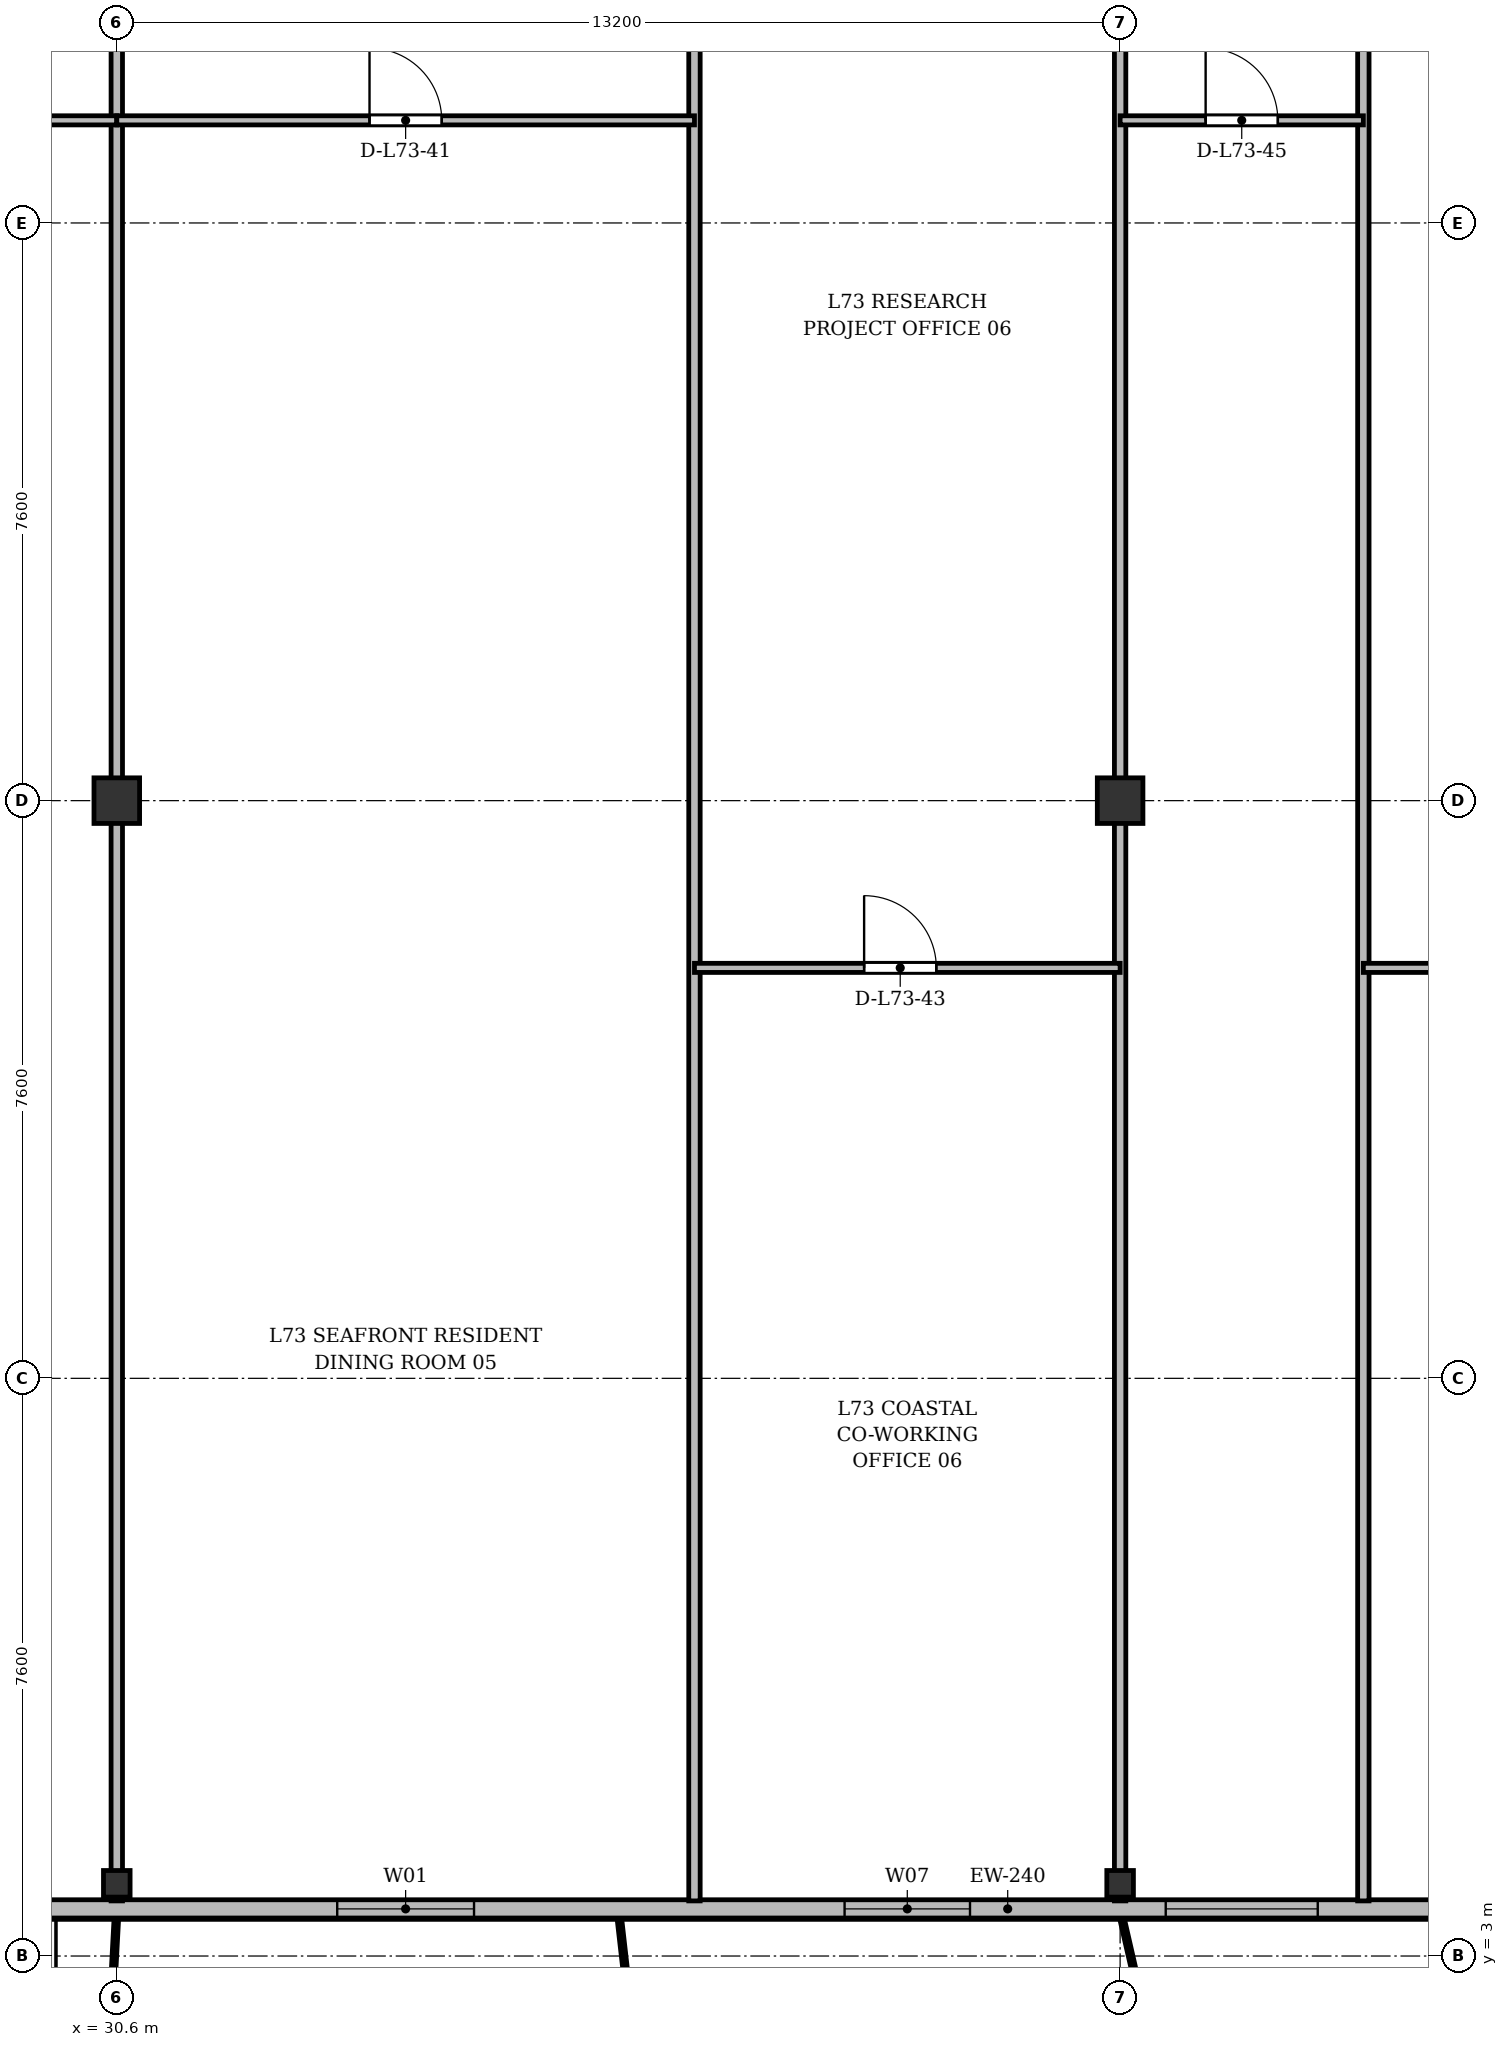
"""IFC4 building model, lengths in metres.
Left out: names, types, materials, properties, quantities, classifications, styles, units other than length and angle.
Written with IfcOpenShell. Run it as: python <this file> out.ifc"""

import sys

from ifc_helpers import new_model, si_unit, direction, frame, frame_2d, origin, origin_2d, place, context, subcontext, project, spatial, rectangle, i_section, extrude, source, transform, mapped, element, fill, save


model = new_model("IFC4")
c1 = context("Model", 3, precision=1e-05, world=origin(), true_north=direction((0.0, 1.0)))
c2 = subcontext(c1, "Body", "Model", "MODEL_VIEW")
j1 = project(units=[si_unit("LENGTHUNIT", "METRE"), si_unit("PLANEANGLEUNIT", "RADIAN")], contexts=[c1])
p1 = place(None, origin())
s1 = spatial("IfcSite", under=j1, at=p1, CompositionType="ELEMENT")
p2 = place(p1, origin())
s2 = spatial("IfcBuilding", under=s1, at=p2, CompositionType="ELEMENT")
p3 = place(p2, frame((0.0, 0.0, 281.1)))
s3 = spatial("IfcBuildingStorey", under=s2, at=p3, CompositionType="ELEMENT", Elevation=281.1)
m1 = source(origin(), c2, "Body", "SweptSolid", [
    extrude(i_section(OverallWidth=0.35, OverallDepth=0.35, WebThickness=0.018, FlangeThickness=0.028, at=origin_2d()), origin(), (0.0, 0.0, 1.0), 3.6),
])
p4 = place(p3, frame((30.6, 3.95, 0.0), z_axis=(0.0, 0.0, 1.0), x_axis=(1.0, 0.0, 0.0)))
e1 = element("IfcColumn", 1, at=p4, inside=s3, PredefinedType="COLUMN", context=c2, shape_type="MappedRepresentation", body=[
    mapped(m1, transform((0.0, 0.0, 0.0), x_axis=(1.0, 0.0, 0.0), y_axis=(0.0, 1.0, 0.0), z_axis=(0.0, 0.0, 1.0), scale=1.0)),
])
m2 = source(origin(), c2, "Body", "SweptSolid", [
    extrude(rectangle(XDim=0.6, YDim=0.6, at=origin_2d()), origin(), (0.0, 0.0, 1.0), 3.6),
])
p5 = place(p3, frame((30.6, 18.2, 0.0), z_axis=(0.0, 0.0, 1.0), x_axis=(1.0, 0.0, 0.0)))
e2 = element("IfcColumn", 2, at=p5, inside=s3, PredefinedType="COLUMN", context=c2, shape_type="MappedRepresentation", body=[
    mapped(m2, transform((0.0, 0.0, 0.0), x_axis=(1.0, 0.0, 0.0), y_axis=(0.0, 1.0, 0.0), z_axis=(0.0, 0.0, 1.0), scale=1.0)),
])
p6 = place(p3, frame((43.8, 3.95, 0.0), z_axis=(0.0, 0.0, 1.0), x_axis=(1.0, 0.0, 0.0)))
e3 = element("IfcColumn", 3, at=p6, inside=s3, PredefinedType="COLUMN", context=c2, shape_type="MappedRepresentation", body=[
    mapped(m1, transform((0.0, 0.0, 0.0), x_axis=(1.0, 0.0, 0.0), y_axis=(0.0, 1.0, 0.0), z_axis=(0.0, 0.0, 1.0), scale=1.0)),
])
p7 = place(p3, frame((43.8, 18.2, 0.0), z_axis=(0.0, 0.0, 1.0), x_axis=(1.0, 0.0, 0.0)))
e4 = element("IfcColumn", 4, at=p7, inside=s3, PredefinedType="COLUMN", context=c2, shape_type="MappedRepresentation", body=[
    mapped(m2, transform((0.0, 0.0, 0.0), x_axis=(1.0, 0.0, 0.0), y_axis=(0.0, 1.0, 0.0), z_axis=(0.0, 0.0, 1.0), scale=1.0)),
])
p8 = place(p3, frame((63.2, 3.62, 0.0), z_axis=(0.0, 0.0, 1.0), x_axis=(-1.0, 0.0, 0.0)))
e5 = element("IfcWall", 5, at=p8, inside=s3, PredefinedType="SOLIDWALL", context=c2, shape_type="SweptSolid", body=[
    extrude(rectangle(XDim=52.0, YDim=0.24, at=frame_2d((26.0, 0.0))), origin(), (0.0, 0.0, 1.0), 3.37),
])
p9 = place(p8, frame((0.745, 0.0, 0.9)))
e6 = element("IfcOpeningElement", 6, at=p9, cuts=e5, PredefinedType="OPENING", context=c2, shape_type="SweptSolid", body=[
    extrude(rectangle(XDim=2.0, YDim=1.95, at=frame_2d((1.0, 0.975))), frame((0.0, 0.13, 0.0), z_axis=(0.0, -1.0, 0.0), x_axis=(1.0, 0.0, 0.0)), (0.0, 0.0, 1.0), 0.26),
])
p10 = place(p8, frame((4.793, 0.0, 0.9)))
e7 = element("IfcOpeningElement", 7, at=p10, cuts=e5, PredefinedType="OPENING", context=c2, shape_type="SweptSolid", body=[
    extrude(rectangle(XDim=1.35, YDim=1.5, at=frame_2d((0.675, 0.75))), frame((0.0, 0.13, 0.0), z_axis=(0.0, -1.0, 0.0), x_axis=(1.0, 0.0, 0.0)), (0.0, 0.0, 1.0), 0.26),
])
p11 = place(p8, frame((6.685, 0.0, 0.0)))
e8 = element("IfcOpeningElement", 8, at=p11, cuts=e5, PredefinedType="OPENING", context=c2, shape_type="SweptSolid", body=[
    extrude(rectangle(XDim=1.2, YDim=2.2, at=frame_2d((0.6, 1.1))), frame((0.0, 0.13, 0.0), z_axis=(0.0, -1.0, 0.0), x_axis=(1.0, 0.0, 0.0)), (0.0, 0.0, 1.0), 0.26),
])
p12 = place(p8, frame((9.634, 0.0, 0.9)))
e9 = element("IfcOpeningElement", 9, at=p12, cuts=e5, PredefinedType="OPENING", context=c2, shape_type="SweptSolid", body=[
    extrude(rectangle(XDim=2.2, YDim=1.8, at=frame_2d((1.1, 0.9))), frame((0.0, 0.13, 0.0), z_axis=(0.0, -1.0, 0.0), x_axis=(1.0, 0.0, 0.0)), (0.0, 0.0, 1.0), 0.26),
])
p13 = place(p8, frame((13.45, 0.0, 0.9)))
e10 = element("IfcOpeningElement", 10, at=p13, cuts=e5, PredefinedType="OPENING", context=c2, shape_type="SweptSolid", body=[
    extrude(rectangle(XDim=1.5, YDim=1.75, at=frame_2d((0.75, 0.875))), frame((0.0, 0.13, 0.0), z_axis=(0.0, -1.0, 0.0), x_axis=(1.0, 0.0, 0.0)), (0.0, 0.0, 1.0), 0.26),
])
p14 = place(p8, frame((16.8, 0.0, 0.9)))
e11 = element("IfcOpeningElement", 11, at=p14, cuts=e5, PredefinedType="OPENING", context=c2, shape_type="SweptSolid", body=[
    extrude(rectangle(XDim=2.0, YDim=1.95, at=frame_2d((1.0, 0.975))), frame((0.0, 0.13, 0.0), z_axis=(0.0, -1.0, 0.0), x_axis=(1.0, 0.0, 0.0)), (0.0, 0.0, 1.0), 0.26),
])
p15 = place(p8, frame((21.375, 0.0, 0.9)))
e12 = element("IfcOpeningElement", 12, at=p15, cuts=e5, PredefinedType="OPENING", context=c2, shape_type="SweptSolid", body=[
    extrude(rectangle(XDim=1.65, YDim=1.85, at=frame_2d((0.825, 0.925))), frame((0.0, 0.13, 0.0), z_axis=(0.0, -1.0, 0.0), x_axis=(1.0, 0.0, 0.0)), (0.0, 0.0, 1.0), 0.26),
])
p16 = place(p8, frame((27.9, 0.0, 0.9)))
e13 = element("IfcOpeningElement", 13, at=p16, cuts=e5, PredefinedType="OPENING", context=c2, shape_type="SweptSolid", body=[
    extrude(rectangle(XDim=1.8, YDim=1.8, at=frame_2d((0.9, 0.9))), frame((0.0, 0.13, 0.0), z_axis=(0.0, -1.0, 0.0), x_axis=(1.0, 0.0, 0.0)), (0.0, 0.0, 1.0), 0.26),
])
p17 = place(p8, frame((33.873, 0.0, 0.0)))
e14 = element("IfcOpeningElement", 14, at=p17, cuts=e5, PredefinedType="OPENING", context=c2, shape_type="SweptSolid", body=[
    extrude(rectangle(XDim=1.2, YDim=2.2, at=frame_2d((0.6, 1.1))), frame((0.0, 0.13, 0.0), z_axis=(0.0, -1.0, 0.0), x_axis=(1.0, 0.0, 0.0)), (0.0, 0.0, 1.0), 0.26),
])
p18 = place(p8, frame((37.05, 0.0, 0.9)))
e15 = element("IfcOpeningElement", 15, at=p18, cuts=e5, PredefinedType="OPENING", context=c2, shape_type="SweptSolid", body=[
    extrude(rectangle(XDim=1.5, YDim=1.75, at=frame_2d((0.75, 0.875))), frame((0.0, 0.13, 0.0), z_axis=(0.0, -1.0, 0.0), x_axis=(1.0, 0.0, 0.0)), (0.0, 0.0, 1.0), 0.26),
])
p19 = place(p8, frame((40.3, 0.0, 0.9)))
e16 = element("IfcOpeningElement", 16, at=p19, cuts=e5, PredefinedType="OPENING", context=c2, shape_type="SweptSolid", body=[
    extrude(rectangle(XDim=2.0, YDim=1.95, at=frame_2d((1.0, 0.975))), frame((0.0, 0.13, 0.0), z_axis=(0.0, -1.0, 0.0), x_axis=(1.0, 0.0, 0.0)), (0.0, 0.0, 1.0), 0.26),
])
p20 = place(p8, frame((43.475, 0.0, 0.9)))
e17 = element("IfcOpeningElement", 17, at=p20, cuts=e5, PredefinedType="OPENING", context=c2, shape_type="SweptSolid", body=[
    extrude(rectangle(XDim=1.65, YDim=1.85, at=frame_2d((0.825, 0.925))), frame((0.0, 0.13, 0.0), z_axis=(0.0, -1.0, 0.0), x_axis=(1.0, 0.0, 0.0)), (0.0, 0.0, 1.0), 0.26),
])
p21 = place(p8, frame((45.99, 0.0, 0.9)))
e18 = element("IfcOpeningElement", 18, at=p21, cuts=e5, PredefinedType="OPENING", context=c2, shape_type="SweptSolid", body=[
    extrude(rectangle(XDim=1.2, YDim=1.65, at=frame_2d((0.6, 0.825))), frame((0.0, 0.13, 0.0), z_axis=(0.0, -1.0, 0.0), x_axis=(1.0, 0.0, 0.0)), (0.0, 0.0, 1.0), 0.26),
])
p22 = place(p8, frame((49.255, 0.0, 0.9)))
e19 = element("IfcOpeningElement", 19, at=p22, cuts=e5, PredefinedType="OPENING", context=c2, shape_type="SweptSolid", body=[
    extrude(rectangle(XDim=2.2, YDim=1.8, at=frame_2d((1.1, 0.9))), frame((0.0, 0.13, 0.0), z_axis=(0.0, -1.0, 0.0), x_axis=(1.0, 0.0, 0.0)), (0.0, 0.0, 1.0), 0.26),
])
p23 = place(p3, frame((30.6, 3.725, 0.0), z_axis=(0.0, 0.0, 1.0), x_axis=(0.0, 1.0, 0.0)))
e20 = element("IfcWall", 20, at=p23, inside=s3, PredefinedType="PARTITIONING", context=c2, shape_type="SweptSolid", body=[
    extrude(rectangle(XDim=27.275, YDim=0.15, at=frame_2d((13.637, 0.0))), origin(), (0.0, 0.0, 1.0), 2.87),
])
p24 = place(p3, frame((38.2, 3.725, 0.0), z_axis=(0.0, 0.0, 1.0), x_axis=(0.0, 1.0, 0.0)))
e21 = element("IfcWall", 21, at=p24, inside=s3, PredefinedType="PARTITIONING", context=c2, shape_type="SweptSolid", body=[
    extrude(rectangle(XDim=27.275, YDim=0.15, at=frame_2d((13.637, 0.0))), origin(), (0.0, 0.0, 1.0), 2.92),
])
p25 = place(p3, frame((43.8, 3.725, 0.0), z_axis=(0.0, 0.0, 1.0), x_axis=(0.0, 1.0, 0.0)))
e22 = element("IfcWall", 22, at=p25, inside=s3, PredefinedType="PARTITIONING", context=c2, shape_type="SweptSolid", body=[
    extrude(rectangle(XDim=27.275, YDim=0.15, at=frame_2d((13.637, 0.0))), origin(), (0.0, 0.0, 1.0), 2.87),
])
p26 = place(p3, frame((47.0, 3.725, 0.0), z_axis=(0.0, 0.0, 1.0), x_axis=(0.0, 1.0, 0.0)))
e23 = element("IfcWall", 23, at=p26, inside=s3, PredefinedType="PARTITIONING", context=c2, shape_type="SweptSolid", body=[
    extrude(rectangle(XDim=27.275, YDim=0.15, at=frame_2d((13.637, 0.0))), origin(), (0.0, 0.0, 1.0), 2.92),
])
p27 = place(p3, frame((27.4, 27.15, 0.0), z_axis=(0.0, 0.0, 1.0), x_axis=(1.0, 0.0, 0.0)))
e24 = element("IfcWall", 24, at=p27, inside=s3, PredefinedType="PARTITIONING", context=c2, shape_type="SweptSolid", body=[
    extrude(rectangle(XDim=3.2, YDim=0.12, at=frame_2d((1.6, 0.0))), origin(), (0.0, 0.0, 1.0), 2.87),
])
p28 = place(p27, frame((1.125, 0.0, 0.0)))
e25 = element("IfcOpeningElement", 25, at=p28, cuts=e24, PredefinedType="OPENING", context=c2, shape_type="SweptSolid", body=[
    extrude(rectangle(XDim=0.95, YDim=2.15, at=frame_2d((0.475, 1.075))), frame((0.0, 0.07, 0.0), z_axis=(0.0, -1.0, 0.0), x_axis=(1.0, 0.0, 0.0)), (0.0, 0.0, 1.0), 0.14),
])
p29 = place(p3, frame((30.6, 27.15, 0.0), z_axis=(0.0, 0.0, 1.0), x_axis=(1.0, 0.0, 0.0)))
e26 = element("IfcWall", 26, at=p29, inside=s3, PredefinedType="PARTITIONING", context=c2, shape_type="SweptSolid", body=[
    extrude(rectangle(XDim=7.6, YDim=0.12, at=frame_2d((3.8, 0.0))), origin(), (0.0, 0.0, 1.0), 2.87),
])
p30 = place(p29, frame((3.325, 0.0, 0.0)))
e27 = element("IfcOpeningElement", 27, at=p30, cuts=e26, PredefinedType="OPENING", context=c2, shape_type="SweptSolid", body=[
    extrude(rectangle(XDim=0.95, YDim=2.15, at=frame_2d((0.475, 1.075))), frame((0.0, 0.07, 0.0), z_axis=(0.0, -1.0, 0.0), x_axis=(1.0, 0.0, 0.0)), (0.0, 0.0, 1.0), 0.14),
])
p31 = place(p3, frame((38.2, 16.0, 0.0), z_axis=(0.0, 0.0, 1.0), x_axis=(1.0, 0.0, 0.0)))
e28 = element("IfcWall", 28, at=p31, inside=s3, PredefinedType="PARTITIONING", context=c2, shape_type="SweptSolid", body=[
    extrude(rectangle(XDim=5.6, YDim=0.12, at=frame_2d((2.8, 0.0))), origin(), (0.0, 0.0, 1.0), 2.87),
])
p32 = place(p31, frame((2.232, 0.0, 0.0)))
e29 = element("IfcOpeningElement", 29, at=p32, cuts=e28, PredefinedType="OPENING", context=c2, shape_type="SweptSolid", body=[
    extrude(rectangle(XDim=0.95, YDim=2.15, at=frame_2d((0.475, 1.075))), frame((0.0, 0.07, 0.0), z_axis=(0.0, -1.0, 0.0), x_axis=(1.0, 0.0, 0.0)), (0.0, 0.0, 1.0), 0.14),
])
p33 = place(p3, frame((43.8, 27.15, 0.0), z_axis=(0.0, 0.0, 1.0), x_axis=(1.0, 0.0, 0.0)))
e30 = element("IfcWall", 30, at=p33, inside=s3, PredefinedType="PARTITIONING", context=c2, shape_type="SweptSolid", body=[
    extrude(rectangle(XDim=3.2, YDim=0.12, at=frame_2d((1.6, 0.0))), origin(), (0.0, 0.0, 1.0), 2.87),
])
p34 = place(p33, frame((1.125, 0.0, 0.0)))
e31 = element("IfcOpeningElement", 31, at=p34, cuts=e30, PredefinedType="OPENING", context=c2, shape_type="SweptSolid", body=[
    extrude(rectangle(XDim=0.95, YDim=2.15, at=frame_2d((0.475, 1.075))), frame((0.0, 0.07, 0.0), z_axis=(0.0, -1.0, 0.0), x_axis=(1.0, 0.0, 0.0)), (0.0, 0.0, 1.0), 0.14),
])
p35 = place(p3, frame((47.0, 16.0, 0.0), z_axis=(0.0, 0.0, 1.0), x_axis=(1.0, 0.0, 0.0)))
e32 = element("IfcWall", 32, at=p35, inside=s3, PredefinedType="PARTITIONING", context=c2, shape_type="SweptSolid", body=[
    extrude(rectangle(XDim=4.0, YDim=0.12, at=frame_2d((2.0, 0.0))), origin(), (0.0, 0.0, 1.0), 2.87),
])
p36 = place(p35, frame((1.525, 0.0, 0.0)))
e33 = element("IfcOpeningElement", 33, at=p36, cuts=e32, PredefinedType="OPENING", context=c2, shape_type="SweptSolid", body=[
    extrude(rectangle(XDim=0.95, YDim=2.15, at=frame_2d((0.475, 1.075))), frame((0.0, 0.07, 0.0), z_axis=(0.0, -1.0, 0.0), x_axis=(1.0, 0.0, 0.0)), (0.0, 0.0, 1.0), 0.14),
])
m3 = source(origin(), c2, "Body", "SweptSolid", [
    extrude(rectangle(XDim=2.0, YDim=1.95, at=frame_2d((1.0, 0.975))), frame((0.0, 0.03, 0.0), z_axis=(0.0, -1.0, 0.0), x_axis=(1.0, 0.0, 0.0)), (0.0, 0.0, 1.0), 0.06),
])
p37 = place(p14, origin())
e34 = element("IfcWindow", 34, at=p37, inside=s3, PartitioningType="SINGLE_PANEL", PredefinedType="WINDOW", context=c2, shape_type="MappedRepresentation", body=[
    mapped(m3, transform((0.0, 0.0, 0.0), x_axis=(1.0, 0.0, 0.0), y_axis=(0.0, 1.0, 0.0), z_axis=(0.0, 0.0, 1.0), scale=1.0)),
])
fill(e11, e34)
m4 = source(origin(), c2, "Body", "SweptSolid", [
    extrude(rectangle(XDim=1.65, YDim=1.85, at=frame_2d((0.825, 0.925))), frame((0.0, 0.03, 0.0), z_axis=(0.0, -1.0, 0.0), x_axis=(1.0, 0.0, 0.0)), (0.0, 0.0, 1.0), 0.06),
])
p38 = place(p15, origin())
e35 = element("IfcWindow", 35, at=p38, inside=s3, PartitioningType="SINGLE_PANEL", PredefinedType="WINDOW", context=c2, shape_type="MappedRepresentation", body=[
    mapped(m4, transform((0.0, 0.0, 0.0), x_axis=(1.0, 0.0, 0.0), y_axis=(0.0, 1.0, 0.0), z_axis=(0.0, 0.0, 1.0), scale=1.0)),
])
fill(e12, e35)
m5 = source(origin(), c2, "Body", "SweptSolid", [
    extrude(rectangle(XDim=1.8, YDim=1.8, at=frame_2d((0.9, 0.9))), frame((0.0, 0.03, 0.0), z_axis=(0.0, -1.0, 0.0), x_axis=(1.0, 0.0, 0.0)), (0.0, 0.0, 1.0), 0.06),
])
p39 = place(p16, origin())
e36 = element("IfcWindow", 36, at=p39, inside=s3, PartitioningType="SINGLE_PANEL", PredefinedType="WINDOW", context=c2, shape_type="MappedRepresentation", body=[
    mapped(m5, transform((0.0, 0.0, 0.0), x_axis=(1.0, 0.0, 0.0), y_axis=(0.0, 1.0, 0.0), z_axis=(0.0, 0.0, 1.0), scale=1.0)),
])
fill(e13, e36)
m6 = source(origin(), c2, "Body", "SweptSolid", [
    extrude(rectangle(XDim=0.95, YDim=2.15, at=frame_2d((0.475, 1.075))), frame((0.0, 0.025, 0.0), z_axis=(0.0, -1.0, 0.0), x_axis=(1.0, 0.0, 0.0)), (0.0, 0.0, 1.0), 0.05),
])
p40 = place(p30, origin())
e37 = element("IfcDoor", 37, at=p40, inside=s3, OperationType="SINGLE_SWING_LEFT", PredefinedType="DOOR", context=c2, shape_type="MappedRepresentation", body=[
    mapped(m6, transform((0.0, 0.0, 0.0), x_axis=(1.0, 0.0, 0.0), y_axis=(0.0, 1.0, 0.0), z_axis=(0.0, 0.0, 1.0), scale=1.0)),
])
fill(e27, e37)
p41 = place(p32, origin())
e38 = element("IfcDoor", 38, at=p41, inside=s3, OperationType="SINGLE_SWING_LEFT", PredefinedType="DOOR", context=c2, shape_type="MappedRepresentation", body=[
    mapped(m6, transform((0.0, 0.0, 0.0), x_axis=(1.0, 0.0, 0.0), y_axis=(0.0, 1.0, 0.0), z_axis=(0.0, 0.0, 1.0), scale=1.0)),
])
fill(e29, e38)
p42 = place(p34, origin())
e39 = element("IfcDoor", 39, at=p42, inside=s3, OperationType="SINGLE_SWING_LEFT", PredefinedType="DOOR", context=c2, shape_type="MappedRepresentation", body=[
    mapped(m6, transform((0.0, 0.0, 0.0), x_axis=(1.0, 0.0, 0.0), y_axis=(0.0, 1.0, 0.0), z_axis=(0.0, 0.0, 1.0), scale=1.0)),
])
fill(e31, e39)
save(model, sys.argv[1])
